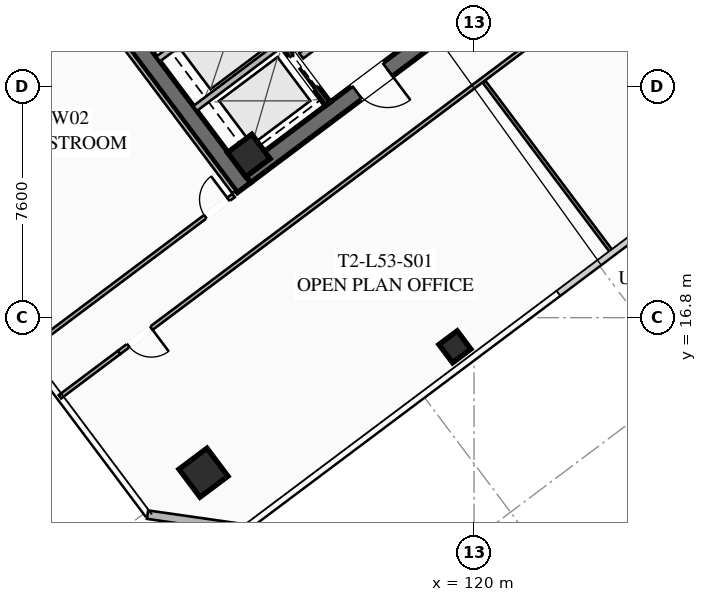
"""IFC4 building model, lengths in metres.
Left out: names, types, materials, properties, quantities, classifications, styles, units other than length and angle.
Written with IfcOpenShell. Run it as: python <this file> out.ifc"""

import sys

from ifc_helpers import new_model, si_unit, direction, frame, frame_2d, origin, origin_2d, place, context, subcontext, project, spatial, rectangle, hollow_rectangle, extrude, element, fill, save


model = new_model("IFC4")
c1 = context("Model", 3, precision=1e-05, world=origin(), true_north=direction((0.0, 1.0)))
c2 = subcontext(c1, "Body", "Model", "MODEL_VIEW")
j1 = project(units=[si_unit("LENGTHUNIT", "METRE"), si_unit("PLANEANGLEUNIT", "RADIAN")], contexts=[c1])
p1 = place(None, origin())
s1 = spatial("IfcSite", under=j1, at=p1, CompositionType="ELEMENT")
p2 = place(p1, origin())
s2 = spatial("IfcBuilding", under=s1, at=p2, CompositionType="ELEMENT")
p3 = place(p2, frame((0.0, 0.0, 196.05)))
s3 = spatial("IfcBuildingStorey", under=s2, at=p3, CompositionType="ELEMENT", Elevation=196.05)
p4 = place(p3, frame((112.436, 21.077, 0.0), z_axis=(0.0, 0.0, 1.0), x_axis=(-0.600005007985, 0.799996243986, 0.0)))
e1 = element("IfcWall", 1, at=p4, inside=s3, PredefinedType="SHEAR", context=c2, shape_type="SweptSolid", body=[
    extrude(rectangle(XDim=15.6, YDim=0.55, at=frame_2d((7.8, 0.0))), origin(), (0.0, 0.0, 1.0), 3.55),
])
p5 = place(p3, frame((124.539, 30.498, 0.0), z_axis=(0.0, 0.0, 1.0), x_axis=(-0.799998054672, -0.600002593761, 0.0)))
e2 = element("IfcWall", 2, at=p5, inside=s3, PredefinedType="SHEAR", context=c2, shape_type="SweptSolid", body=[
    extrude(rectangle(XDim=15.06, YDim=0.55, at=frame_2d((7.53, 0.0))), origin(), (0.0, 0.0, 1.0), 3.55),
])
p6 = place(p5, frame((9.23, 0.0, 0.0)))
e3 = element("IfcOpeningElement", 3, at=p6, cuts=e2, PredefinedType="OPENING", context=c2, shape_type="SweptSolid", body=[
    extrude(rectangle(XDim=1.25, YDim=2.25, at=frame_2d((0.625, 1.125))), frame((0.0, 0.285, 0.0), z_axis=(0.0, -1.0, 0.0), x_axis=(1.0, 0.0, 0.0)), (0.0, 0.0, 1.0), 0.57),
])
p7 = place(p5, frame((4.18, 0.0, 0.0)))
e4 = element("IfcOpeningElement", 4, at=p7, cuts=e2, PredefinedType="OPENING", context=c2, shape_type="SweptSolid", body=[
    extrude(rectangle(XDim=1.25, YDim=2.25, at=frame_2d((0.625, 1.125))), frame((0.0, 0.285, 0.0), z_axis=(0.0, -1.0, 0.0), x_axis=(1.0, 0.0, 0.0)), (0.0, 0.0, 1.0), 0.57),
])
p8 = place(p3, frame((112.59, 22.13, 0.0), z_axis=(0.0, 0.0, 1.0), x_axis=(0.799999996291, 0.600000004945, 0.0)))
e5 = element("IfcColumn", 5, at=p8, inside=s3, PredefinedType="COLUMN", context=c2, shape_type="SweptSolid", body=[
    extrude(hollow_rectangle(XDim=1.0, YDim=1.0, WallThickness=0.04, at=origin_2d()), origin(), (0.0, 0.0, 1.0), 3.25),
])
p9 = place(p3, frame((111.1, 11.7, 0.0), z_axis=(0.0, 0.0, 1.0), x_axis=(0.799999996291, 0.600000004945, 0.0)))
e6 = element("IfcColumn", 6, at=p9, inside=s3, PredefinedType="COLUMN", context=c2, shape_type="SweptSolid", body=[
    extrude(hollow_rectangle(XDim=1.15, YDim=1.15, WallThickness=0.045, at=origin_2d()), origin(), (0.0, 0.0, 1.0), 3.25),
])
p10 = place(p3, frame((119.37, 15.84, 0.0), z_axis=(0.0, 0.0, 1.0), x_axis=(0.799999996291, 0.600000004945, 0.0)))
e7 = element("IfcColumn", 7, at=p10, inside=s3, PredefinedType="COLUMN", context=c2, shape_type="SweptSolid", body=[
    extrude(hollow_rectangle(XDim=0.75, YDim=0.75, WallThickness=0.032, at=origin_2d()), origin(), (0.0, 0.0, 1.0), 3.25),
])
p11 = place(p3, frame((112.48, 9.86, 0.0), z_axis=(0.0, 0.0, 1.0), x_axis=(-0.989950994782, 0.141410847992, 0.0)))
e8 = element("IfcWall", 8, at=p11, inside=s3, PredefinedType="SOLIDWALL", context=c2, shape_type="SweptSolid", body=[
    extrude(rectangle(XDim=3.253, YDim=0.28, at=frame_2d((1.626, 0.0))), origin(), (0.0, 0.0, 1.0), 3.25),
])
p12 = place(p3, frame((114.316, 25.412, 0.0), z_axis=(0.0, 0.0, 1.0), x_axis=(0.800018601094, 0.59997519774, 0.0)))
e9 = element("IfcWall", 9, at=p12, inside=s3, PredefinedType="SOLIDWALL", context=c2, shape_type="SweptSolid", body=[
    extrude(rectangle(XDim=3.15, YDim=0.22, at=frame_2d((1.575, 0.0))), origin(), (0.0, 0.0, 1.0), 2.393),
])
p13 = place(p12, frame((0.95, 0.0, 0.0)))
e10 = element("IfcOpeningElement", 10, at=p13, cuts=e9, PredefinedType="OPENING", context=c2, shape_type="SweptSolid", body=[
    extrude(rectangle(XDim=1.25, YDim=2.25, at=frame_2d((0.625, 1.125))), frame((0.0, 0.12, 0.0), z_axis=(0.0, -1.0, 0.0), x_axis=(1.0, 0.0, 0.0)), (0.0, 0.0, 1.0), 0.24),
])
p14 = place(p3, frame((115.19, 23.83, 0.0), z_axis=(0.0, 0.0, 1.0), x_axis=(-0.599993943644, 0.800004542231, 0.0)))
e11 = element("IfcWall", 11, at=p14, inside=s3, PredefinedType="SHEAR", context=c2, shape_type="SweptSolid", body=[
    extrude(rectangle(XDim=6.45, YDim=0.2, at=frame_2d((3.225, 0.0))), origin(), (0.0, 0.0, 1.0), 3.25),
])
p15 = place(p14, frame((4.875, 0.0, 0.0)))
e12 = element("IfcOpeningElement", 12, at=p15, cuts=e11, PredefinedType="OPENING", context=c2, shape_type="SweptSolid", body=[
    extrude(rectangle(XDim=1.3, YDim=2.25, at=frame_2d((0.65, 1.125))), frame((0.0, 0.11, 0.0), z_axis=(0.0, -1.0, 0.0), x_axis=(1.0, 0.0, 0.0)), (0.0, 0.0, 1.0), 0.22),
])
p16 = place(p14, frame((2.875, 0.0, 0.0)))
e13 = element("IfcOpeningElement", 13, at=p16, cuts=e11, PredefinedType="OPENING", context=c2, shape_type="SweptSolid", body=[
    extrude(rectangle(XDim=1.3, YDim=2.25, at=frame_2d((0.65, 1.125))), frame((0.0, 0.11, 0.0), z_axis=(0.0, -1.0, 0.0), x_axis=(1.0, 0.0, 0.0)), (0.0, 0.0, 1.0), 0.22),
])
p17 = place(p14, frame((0.675, 0.0, 0.0)))
e14 = element("IfcOpeningElement", 14, at=p17, cuts=e11, PredefinedType="OPENING", context=c2, shape_type="SweptSolid", body=[
    extrude(rectangle(XDim=1.3, YDim=2.25, at=frame_2d((0.65, 1.125))), frame((0.0, 0.11, 0.0), z_axis=(0.0, -1.0, 0.0), x_axis=(1.0, 0.0, 0.0)), (0.0, 0.0, 1.0), 0.22),
])
for number, where, z_axis, x_axis in (
    (15, (110.826, 23.682, 0.0), (0.0, 0.0, 1.0), (0.8, 0.6, 0.0)),
    (16, (109.608, 25.306, 0.0), (0.0, 0.0, 1.0), (0.8, 0.6, 0.0)),
):
    element("IfcWall", number, at=place(p3, frame(where, z_axis=z_axis, x_axis=x_axis)), inside=s3, PredefinedType="SOLIDWALL", context=c2, shape_type="SweptSolid", body=[
        extrude(rectangle(XDim=3.48, YDim=0.2, at=frame_2d((1.74, 0.0))), origin(), (0.0, 0.0, 1.0), 3.25),
    ])
p18 = place(p3, frame((131.282, 32.874, 0.0), z_axis=(0.0, 0.0, 1.0), x_axis=(-0.8, -0.6, 0.0)))
e17 = element("IfcWall", 17, at=p18, inside=s3, PredefinedType="PARTITIONING", context=c2, shape_type="SweptSolid", body=[
    extrude(rectangle(XDim=28.7, YDim=0.135, at=frame_2d((14.35, 0.0))), origin(), (0.0, 0.0, 1.0), 2.393),
])
p19 = place(p18, frame((27.37, 0.0, 0.0)))
e18 = element("IfcOpeningElement", 18, at=p19, cuts=e17, PredefinedType="OPENING", context=c2, shape_type="SweptSolid", body=[
    extrude(rectangle(XDim=0.95, YDim=2.05, at=frame_2d((0.475, 1.025))), frame((0.0, 0.077, 0.0), z_axis=(0.0, -1.0, 0.0), x_axis=(1.0, 0.0, 0.0)), (0.0, 0.0, 1.0), 0.155),
])
p20 = place(p18, frame((0.38, 0.0, 0.0)))
e19 = element("IfcOpeningElement", 19, at=p20, cuts=e17, PredefinedType="OPENING", context=c2, shape_type="SweptSolid", body=[
    extrude(rectangle(XDim=0.95, YDim=2.05, at=frame_2d((0.475, 1.025))), frame((0.0, 0.077, 0.0), z_axis=(0.0, -1.0, 0.0), x_axis=(1.0, 0.0, 0.0)), (0.0, 0.0, 1.0), 0.155),
])
p21 = place(p3, frame((106.378, 14.196, 0.0), z_axis=(0.0, 0.0, 1.0), x_axis=(0.800012055778, 0.599983925293, 0.0)))
e20 = element("IfcWall", 20, at=p21, inside=s3, PredefinedType="PARTITIONING", context=c2, shape_type="SweptSolid", body=[
    extrude(rectangle(XDim=2.43, YDim=0.135, at=frame_2d((1.215, 0.0))), origin(), (0.0, 0.0, 1.0), 2.393),
])
p22 = place(p3, frame((124.548, 18.936, 0.0), z_axis=(0.0, 0.0, 1.0), x_axis=(-0.6, 0.8, 0.0)))
e21 = element("IfcWall", 21, at=p22, inside=s3, PredefinedType="PARTITIONING", context=c2, shape_type="SweptSolid", body=[
    extrude(rectangle(XDim=7.03, YDim=0.11, at=frame_2d((3.515, 0.0))), origin(), (0.0, 0.0, 1.0), 2.393),
])
p23 = place(p3, frame((112.104, 20.928, 0.0), z_axis=(0.0, 0.0, 1.0), x_axis=(-0.599994940075, 0.800003794918, 0.0)))
e22 = element("IfcWall", 22, at=p23, inside=s3, PredefinedType="PARTITIONING", context=c2, shape_type="SweptSolid", body=[
    extrude(rectangle(XDim=15.44, YDim=0.135, at=frame_2d((7.72, 0.0))), origin(), (0.0, 0.0, 1.0), 2.393),
])
p24 = place(p3, frame((105.256, 15.692, 0.0), z_axis=(0.0, 0.0, 1.0), x_axis=(0.799989708052, 0.600013722352, 0.0)))
e23 = element("IfcWall", 23, at=p24, inside=s3, PredefinedType="PARTITIONING", context=c2, shape_type="SweptSolid", body=[
    extrude(rectangle(XDim=8.54, YDim=0.135, at=frame_2d((4.27, 0.0))), origin(), (0.0, 0.0, 1.0), 2.393),
])
p25 = place(p24, frame((7.38, 0.0, 0.0)))
e24 = element("IfcOpeningElement", 24, at=p25, cuts=e23, PredefinedType="OPENING", context=c2, shape_type="SweptSolid", body=[
    extrude(rectangle(XDim=0.95, YDim=2.05, at=frame_2d((0.475, 1.025))), frame((0.0, 0.077, 0.0), z_axis=(0.0, -1.0, 0.0), x_axis=(1.0, 0.0, 0.0)), (0.0, 0.0, 1.0), 0.155),
])
p26 = place(p6, origin())
e25 = element("IfcDoor", 25, at=p26, inside=s3, OperationType="SINGLE_SWING_LEFT", PredefinedType="DOOR", context=c2, shape_type="SweptSolid", body=[
    extrude(rectangle(XDim=1.25, YDim=2.25, at=frame_2d((0.625, 1.125))), frame((0.0, 0.025, 0.0), z_axis=(0.0, -1.0, 0.0), x_axis=(1.0, 0.0, 0.0)), (0.0, 0.0, 1.0), 0.05),
])
fill(e3, e25)
p27 = place(p19, origin())
e26 = element("IfcDoor", 26, at=p27, inside=s3, OperationType="SINGLE_SWING_LEFT", PredefinedType="DOOR", context=c2, shape_type="SweptSolid", body=[
    extrude(rectangle(XDim=0.95, YDim=2.05, at=frame_2d((0.475, 1.025))), frame((0.0, 0.025, 0.0), z_axis=(0.0, -1.0, 0.0), x_axis=(1.0, 0.0, 0.0)), (0.0, 0.0, 1.0), 0.05),
])
fill(e18, e26)
p28 = place(p25, origin())
e27 = element("IfcDoor", 27, at=p28, inside=s3, OperationType="SINGLE_SWING_RIGHT", PredefinedType="DOOR", context=c2, shape_type="SweptSolid", body=[
    extrude(rectangle(XDim=0.95, YDim=2.05, at=frame_2d((0.475, 1.025))), frame((0.0, 0.025, 0.0), z_axis=(0.0, -1.0, 0.0), x_axis=(1.0, 0.0, 0.0)), (0.0, 0.0, 1.0), 0.05),
])
fill(e24, e27)
p29 = place(p17, origin())
e28 = element("IfcDoor", 28, at=p29, inside=s3, OperationType="SLIDING_TO_LEFT", PredefinedType="DOOR", context=c2, shape_type="SweptSolid", body=[
    extrude(rectangle(XDim=1.3, YDim=2.25, at=frame_2d((0.65, 1.125))), frame((0.0, 0.025, 0.0), z_axis=(0.0, -1.0, 0.0), x_axis=(1.0, 0.0, 0.0)), (0.0, 0.0, 1.0), 0.05),
])
fill(e14, e28)
save(model, sys.argv[1])
